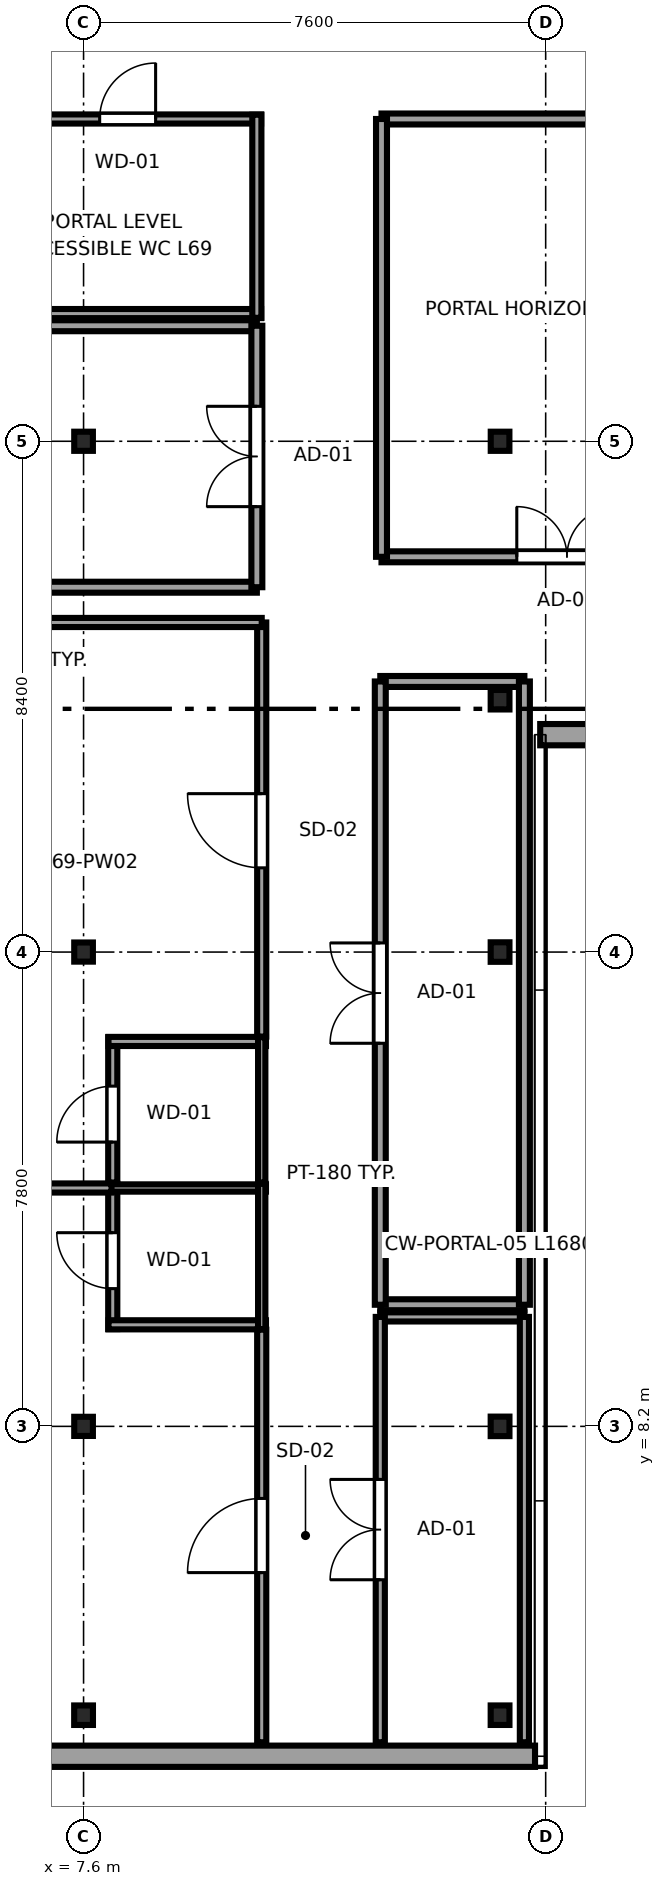
"""IFC4 building model, lengths in metres.
Left out: names, types, materials, properties, quantities, classifications, styles, units other than length and angle.
Written with IfcOpenShell. Run it as: python <this file> out.ifc"""

import sys

from ifc_helpers import new_model, si_unit, direction, frame, frame_2d, origin, origin_2d, place, context, subcontext, project, spatial, rectangle, i_section, extrude, source, transform, mapped, element, fill, save


model = new_model("IFC4")
c1 = context("Model", 3, precision=1e-05, world=origin(), true_north=direction((0.0, 1.0)))
c2 = subcontext(c1, "Body", "Model", "MODEL_VIEW")
j1 = project(units=[si_unit("LENGTHUNIT", "METRE"), si_unit("PLANEANGLEUNIT", "RADIAN")], contexts=[c1])
p1 = place(None, origin())
s1 = spatial("IfcSite", under=j1, at=p1, CompositionType="ELEMENT")
p2 = place(p1, origin())
s2 = spatial("IfcBuilding", under=s1, at=p2, CompositionType="ELEMENT")
p3 = place(p2, frame((0.0, 0.0, 259.4)))
s3 = spatial("IfcBuildingStorey", under=s2, at=p3, CompositionType="ELEMENT", Elevation=259.4)
m1 = source(origin(), c2, "Body", "SweptSolid", [
    extrude(i_section(OverallWidth=0.309, OverallDepth=0.321, WebThickness=0.014, FlangeThickness=0.022, FilletRadius=0.017, at=origin_2d()), origin(), (0.0, 0.0, 1.0), 3.55),
])
p4 = place(p3, frame((7.6, 3.45, 0.0), z_axis=(0.0, 0.0, 1.0), x_axis=(1.0, 0.0, 0.0)))
e1 = element("IfcColumn", 1, at=p4, inside=s3, PredefinedType="COLUMN", context=c2, shape_type="MappedRepresentation", body=[
    mapped(m1, transform((0.0, 0.0, 0.0), x_axis=(1.0, 0.0, 0.0), y_axis=(0.0, 1.0, 0.0), z_axis=(0.0, 0.0, 1.0), scale=1.0)),
])
m2 = source(origin(), c2, "Body", "SweptSolid", [
    extrude(i_section(OverallWidth=0.307, OverallDepth=0.315, WebThickness=0.012, FlangeThickness=0.019, FilletRadius=0.017, at=origin_2d()), origin(), (0.0, 0.0, 1.0), 3.55),
])
for number, where, z_axis, x_axis in (
    (2, (7.6, 8.2, 0.0), (0.0, 0.0, 1.0), (1.0, 0.0, 0.0)),
    (3, (7.6, 16.0, 0.0), (0.0, 0.0, 1.0), (1.0, 0.0, 0.0)),
):
    element("IfcColumn", number, at=place(p3, frame(where, z_axis=z_axis, x_axis=x_axis)), inside=s3, PredefinedType="COLUMN", context=c2, shape_type="MappedRepresentation", body=[
        mapped(m2, transform((0.0, 0.0, 0.0), x_axis=(1.0, 0.0, 0.0), y_axis=(0.0, 1.0, 0.0), z_axis=(0.0, 0.0, 1.0), scale=1.0)),
    ])
for number, where, z_axis, x_axis in (
    (4, (14.45, 3.45, 0.0), (0.0, 0.0, 1.0), (1.0, 0.0, 0.0)),
    (5, (14.45, 8.2, 0.0), (0.0, 0.0, 1.0), (1.0, 0.0, 0.0)),
    (6, (14.45, 16.0, 0.0), (0.0, 0.0, 1.0), (1.0, 0.0, 0.0)),
):
    element("IfcColumn", number, at=place(p3, frame(where, z_axis=z_axis, x_axis=x_axis)), inside=s3, PredefinedType="COLUMN", context=c2, shape_type="MappedRepresentation", body=[
        mapped(m1, transform((0.0, 0.0, 0.0), x_axis=(1.0, 0.0, 0.0), y_axis=(0.0, 1.0, 0.0), z_axis=(0.0, 0.0, 1.0), scale=1.0)),
    ])
for number, where, z_axis, x_axis in (
    (7, (7.6, 24.4, 0.0), (0.0, 0.0, 1.0), (1.0, 0.0, 0.0)),
    (8, (14.45, 24.4, 0.0), (0.0, 0.0, 1.0), (1.0, 0.0, 0.0)),
):
    element("IfcColumn", number, at=place(p3, frame(where, z_axis=z_axis, x_axis=x_axis)), inside=s3, PredefinedType="COLUMN", context=c2, shape_type="MappedRepresentation", body=[
        mapped(m2, transform((0.0, 0.0, 0.0), x_axis=(1.0, 0.0, 0.0), y_axis=(0.0, 1.0, 0.0), z_axis=(0.0, 0.0, 1.0), scale=1.0)),
    ])
p5 = place(p3, frame((14.45, 20.15, 0.0), z_axis=(0.0, 0.0, 1.0), x_axis=(1.0, 0.0, 0.0)))
e9 = element("IfcColumn", 9, at=p5, inside=s3, PredefinedType="COLUMN", context=c2, shape_type="MappedRepresentation", body=[
    mapped(m1, transform((0.0, 0.0, 0.0), x_axis=(1.0, 0.0, 0.0), y_axis=(0.0, 1.0, 0.0), z_axis=(0.0, 0.0, 1.0), scale=1.0)),
])
p6 = place(p3, frame((7.017, 2.775, 0.0), z_axis=(0.0, 0.0, 1.0), x_axis=(1.0, 0.0, 0.0)))
e10 = element("IfcWall", 10, at=p6, inside=s3, PredefinedType="SOLIDWALL", context=c2, shape_type="SweptSolid", body=[
    extrude(rectangle(XDim=8.008, YDim=0.35, at=frame_2d((4.004, 0.0))), origin(), (0.0, 0.0, 1.0), 3.37),
])
p7 = place(p3, frame((15.11, 19.575, 0.0), z_axis=(0.0, 0.0, 1.0), x_axis=(1.0, 0.0, 0.0)))
e11 = element("IfcWall", 11, at=p7, inside=s3, PredefinedType="SOLIDWALL", context=c2, shape_type="SweptSolid", body=[
    extrude(rectangle(XDim=16.98, YDim=0.35, at=frame_2d((8.49, 0.0))), origin(), (0.0, 0.0, 1.0), 3.37),
])
p8 = place(p7, frame((1.88, 0.0, 0.68)))
e12 = element("IfcOpeningElement", 12, at=p8, cuts=e11, PredefinedType="OPENING", context=c2, shape_type="SweptSolid", body=[
    extrude(rectangle(XDim=2.7, YDim=1.95, at=frame_2d((1.35, 0.975))), frame((0.0, 0.185, 0.0), z_axis=(0.0, -1.0, 0.0), x_axis=(1.0, 0.0, 0.0)), (0.0, 0.0, 1.0), 0.37),
])
p9 = place(p7, frame((7.14, 0.0, 0.68)))
e13 = element("IfcOpeningElement", 13, at=p9, cuts=e11, PredefinedType="OPENING", context=c2, shape_type="SweptSolid", body=[
    extrude(rectangle(XDim=2.7, YDim=1.95, at=frame_2d((1.35, 0.975))), frame((0.0, 0.185, 0.0), z_axis=(0.0, -1.0, 0.0), x_axis=(1.0, 0.0, 0.0)), (0.0, 0.0, 1.0), 0.37),
])
p10 = place(p7, frame((12.4, 0.0, 0.68)))
e14 = element("IfcOpeningElement", 14, at=p10, cuts=e11, PredefinedType="OPENING", context=c2, shape_type="SweptSolid", body=[
    extrude(rectangle(XDim=2.7, YDim=1.95, at=frame_2d((1.35, 0.975))), frame((0.0, 0.185, 0.0), z_axis=(0.0, -1.0, 0.0), x_axis=(1.0, 0.0, 0.0)), (0.0, 0.0, 1.0), 0.37),
])
p11 = place(p3, frame((8.08, 9.8, 0.0), z_axis=(0.0, 0.0, 1.0), x_axis=(0.0, 1.0, 0.0)))
e15 = element("IfcWall", 15, at=p11, inside=s3, PredefinedType="PARTITIONING", context=c2, shape_type="SweptSolid", body=[
    extrude(rectangle(XDim=2.39, YDim=0.15, at=frame_2d((1.195, 0.0))), origin(), (0.0, 0.0, 1.0), 3.37),
])
p12 = place(p11, frame((0.665, 0.0, 0.0)))
e16 = element("IfcOpeningElement", 16, at=p12, cuts=e15, PredefinedType="OPENING", context=c2, shape_type="SweptSolid", body=[
    extrude(rectangle(XDim=0.92, YDim=2.01, at=frame_2d((0.46, 1.005))), frame((0.0, 0.085, 0.0), z_axis=(0.0, -1.0, 0.0), x_axis=(1.0, 0.0, 0.0)), (0.0, 0.0, 1.0), 0.17),
])
p13 = place(p3, frame((8.01, 9.87, 0.0), z_axis=(0.0, 0.0, 1.0), x_axis=(1.0, 0.0, 0.0)))
e17 = element("IfcWall", 17, at=p13, inside=s3, PredefinedType="PARTITIONING", context=c2, shape_type="SweptSolid", body=[
    extrude(rectangle(XDim=2.59, YDim=0.15, at=frame_2d((1.295, 0.0))), origin(), (0.0, 0.0, 1.0), 3.37),
])
p14 = place(p3, frame((8.01, 12.12, 0.0), z_axis=(0.0, 0.0, 1.0), x_axis=(1.0, 0.0, 0.0)))
e18 = element("IfcWall", 18, at=p14, inside=s3, PredefinedType="PLUMBINGWALL", context=c2, shape_type="SweptSolid", body=[
    extrude(rectangle(XDim=2.59, YDim=0.12, at=frame_2d((1.295, 0.0))), origin(), (0.0, 0.0, 1.0), 3.37),
])
p15 = place(p3, frame((10.53, 9.8, 0.0), z_axis=(0.0, 0.0, 1.0), x_axis=(0.0, 1.0, 0.0)))
e19 = element("IfcWall", 19, at=p15, inside=s3, PredefinedType="PLUMBINGWALL", context=c2, shape_type="SweptSolid", body=[
    extrude(rectangle(XDim=2.39, YDim=0.12, at=frame_2d((1.195, 0.0))), origin(), (0.0, 0.0, 1.0), 3.37),
])
p16 = place(p3, frame((8.08, 12.21, 0.0), z_axis=(0.0, 0.0, 1.0), x_axis=(0.0, 1.0, 0.0)))
e20 = element("IfcWall", 20, at=p16, inside=s3, PredefinedType="PARTITIONING", context=c2, shape_type="SweptSolid", body=[
    extrude(rectangle(XDim=2.39, YDim=0.15, at=frame_2d((1.195, 0.0))), origin(), (0.0, 0.0, 1.0), 3.37),
])
p17 = place(p16, frame((0.665, 0.0, 0.0)))
e21 = element("IfcOpeningElement", 21, at=p17, cuts=e20, PredefinedType="OPENING", context=c2, shape_type="SweptSolid", body=[
    extrude(rectangle(XDim=0.92, YDim=2.01, at=frame_2d((0.46, 1.005))), frame((0.0, 0.085, 0.0), z_axis=(0.0, -1.0, 0.0), x_axis=(1.0, 0.0, 0.0)), (0.0, 0.0, 1.0), 0.17),
])
p18 = place(p3, frame((8.01, 14.53, 0.0), z_axis=(0.0, 0.0, 1.0), x_axis=(1.0, 0.0, 0.0)))
e22 = element("IfcWall", 22, at=p18, inside=s3, PredefinedType="PARTITIONING", context=c2, shape_type="SweptSolid", body=[
    extrude(rectangle(XDim=2.59, YDim=0.15, at=frame_2d((1.295, 0.0))), origin(), (0.0, 0.0, 1.0), 3.37),
])
p19 = place(p3, frame((10.53, 12.21, 0.0), z_axis=(0.0, 0.0, 1.0), x_axis=(0.0, 1.0, 0.0)))
e23 = element("IfcWall", 23, at=p19, inside=s3, PredefinedType="PLUMBINGWALL", context=c2, shape_type="SweptSolid", body=[
    extrude(rectangle(XDim=2.39, YDim=0.12, at=frame_2d((1.195, 0.0))), origin(), (0.0, 0.0, 1.0), 3.37),
])
p20 = place(p3, frame((10.53, 3.005, 0.0), z_axis=(0.0, 0.0, 1.0), x_axis=(0.0, 1.0, 0.0)))
e24 = element("IfcWall", 24, at=p20, inside=s3, PredefinedType="PARTITIONING", context=c2, shape_type="SweptSolid", body=[
    extrude(rectangle(XDim=6.785, YDim=0.15, at=frame_2d((3.393, 0.0))), origin(), (0.0, 0.0, 1.0), 3.37),
])
p21 = place(p20, frame((2.79, 0.0, 0.0)))
e25 = element("IfcOpeningElement", 25, at=p21, cuts=e24, PredefinedType="OPENING", context=c2, shape_type="SweptSolid", body=[
    extrude(rectangle(XDim=1.22, YDim=2.08, at=frame_2d((0.61, 1.04))), frame((0.0, 0.085, 0.0), z_axis=(0.0, -1.0, 0.0), x_axis=(1.0, 0.0, 0.0)), (0.0, 0.0, 1.0), 0.17),
])
p22 = place(p3, frame((3.005, 12.12, 0.0), z_axis=(0.0, 0.0, 1.0), x_axis=(1.0, 0.0, 0.0)))
e26 = element("IfcWall", 26, at=p22, inside=s3, PredefinedType="PARTITIONING", context=c2, shape_type="SweptSolid", body=[
    extrude(rectangle(XDim=5.055, YDim=0.15, at=frame_2d((2.528, 0.0))), origin(), (0.0, 0.0, 1.0), 3.37),
])
p23 = place(p3, frame((10.53, 14.61, 0.0), z_axis=(0.0, 0.0, 1.0), x_axis=(0.0, 1.0, 0.0)))
e27 = element("IfcWall", 27, at=p23, inside=s3, PredefinedType="PARTITIONING", context=c2, shape_type="SweptSolid", body=[
    extrude(rectangle(XDim=6.81, YDim=0.15, at=frame_2d((3.405, 0.0))), origin(), (0.0, 0.0, 1.0), 3.37),
])
p24 = place(p23, frame((2.775, 0.0, 0.0)))
e28 = element("IfcOpeningElement", 28, at=p24, cuts=e27, PredefinedType="OPENING", context=c2, shape_type="SweptSolid", body=[
    extrude(rectangle(XDim=1.22, YDim=2.08, at=frame_2d((0.61, 1.04))), frame((0.0, 0.085, 0.0), z_axis=(0.0, -1.0, 0.0), x_axis=(1.0, 0.0, 0.0)), (0.0, 0.0, 1.0), 0.17),
])
p25 = place(p3, frame((3.005, 21.42, 0.0), z_axis=(0.0, 0.0, 1.0), x_axis=(1.0, 0.0, 0.0)))
e29 = element("IfcWall", 29, at=p25, inside=s3, PredefinedType="PARTITIONING", context=c2, shape_type="SweptSolid", body=[
    extrude(rectangle(XDim=7.525, YDim=0.15, at=frame_2d((3.763, 0.0))), origin(), (0.0, 0.0, 1.0), 3.37),
])
for number, where, z_axis, x_axis in (
    (30, (12.48, 10.2, 0.0), (0.0, 0.0, 1.0), (1.0, 0.0, 0.0)),
    (31, (12.48, 20.45, 0.0), (0.0, 0.0, 1.0), (1.0, 0.0, 0.0)),
):
    element("IfcWall", number, at=place(p3, frame(where, z_axis=z_axis, x_axis=x_axis)), inside=s3, PredefinedType="PARTITIONING", context=c2, shape_type="SweptSolid", body=[
        extrude(rectangle(XDim=2.37, YDim=0.18, at=frame_2d((1.185, 0.0))), origin(), (0.0, 0.0, 1.0), 3.37),
    ])
p26 = place(p3, frame((12.48, 10.2, 0.0), z_axis=(0.0, 0.0, 1.0), x_axis=(0.0, 1.0, 0.0)))
e32 = element("IfcWall", 32, at=p26, inside=s3, PredefinedType="PARTITIONING", context=c2, shape_type="SweptSolid", body=[
    extrude(rectangle(XDim=10.25, YDim=0.18, at=frame_2d((5.125, 0.0))), origin(), (0.0, 0.0, 1.0), 3.37),
])
p27 = place(p26, frame((4.3, 0.0, 0.0)))
e33 = element("IfcOpeningElement", 33, at=p27, cuts=e32, PredefinedType="OPENING", context=c2, shape_type="SweptSolid", body=[
    extrude(rectangle(XDim=1.65, YDim=2.15, at=frame_2d((0.825, 1.075))), frame((0.0, 0.1, 0.0), z_axis=(0.0, -1.0, 0.0), x_axis=(1.0, 0.0, 0.0)), (0.0, 0.0, 1.0), 0.2),
])
p28 = place(p3, frame((14.85, 10.2, 0.0), z_axis=(0.0, 0.0, 1.0), x_axis=(0.0, 1.0, 0.0)))
e34 = element("IfcWall", 34, at=p28, inside=s3, PredefinedType="PARTITIONING", context=c2, shape_type="SweptSolid", body=[
    extrude(rectangle(XDim=10.25, YDim=0.18, at=frame_2d((5.125, 0.0))), origin(), (0.0, 0.0, 1.0), 3.37),
])
p29 = place(p3, frame((12.48, 10.0, 0.0), z_axis=(0.0, 0.0, 1.0), x_axis=(1.0, 0.0, 0.0)))
e35 = element("IfcWall", 35, at=p29, inside=s3, PredefinedType="PARTITIONING", context=c2, shape_type="SweptSolid", body=[
    extrude(rectangle(XDim=2.37, YDim=0.15, at=frame_2d((1.185, 0.0))), origin(), (0.0, 0.0, 1.0), 3.37),
])
p30 = place(p3, frame((12.48, 3.005, 0.0), z_axis=(0.0, 0.0, 1.0), x_axis=(0.0, 1.0, 0.0)))
e36 = element("IfcWall", 36, at=p30, inside=s3, PredefinedType="PARTITIONING", context=c2, shape_type="SweptSolid", body=[
    extrude(rectangle(XDim=6.995, YDim=0.15, at=frame_2d((3.498, 0.0))), origin(), (0.0, 0.0, 1.0), 3.37),
])
p31 = place(p30, frame((2.673, 0.0, 0.0)))
e37 = element("IfcOpeningElement", 37, at=p31, cuts=e36, PredefinedType="OPENING", context=c2, shape_type="SweptSolid", body=[
    extrude(rectangle(XDim=1.65, YDim=2.15, at=frame_2d((0.825, 1.075))), frame((0.0, 0.085, 0.0), z_axis=(0.0, -1.0, 0.0), x_axis=(1.0, 0.0, 0.0)), (0.0, 0.0, 1.0), 0.17),
])
p32 = place(p3, frame((14.85, 3.005, 0.0), z_axis=(0.0, 0.0, 1.0), x_axis=(0.0, 1.0, 0.0)))
e38 = element("IfcWall", 38, at=p32, inside=s3, PredefinedType="PARTITIONING", context=c2, shape_type="SweptSolid", body=[
    extrude(rectangle(XDim=6.995, YDim=0.15, at=frame_2d((3.498, 0.0))), origin(), (0.0, 0.0, 1.0), 3.37),
])
p33 = place(p3, frame((12.5, 22.5, 0.0), z_axis=(0.0, 0.0, 1.0), x_axis=(1.0, 0.0, 0.0)))
e39 = element("IfcWall", 39, at=p33, inside=s3, PredefinedType="PARTITIONING", context=c2, shape_type="SweptSolid", body=[
    extrude(rectangle(XDim=6.1, YDim=0.18, at=frame_2d((3.05, 0.0))), origin(), (0.0, 0.0, 1.0), 3.37),
])
p34 = place(p33, frame((2.225, 0.0, 0.0)))
e40 = element("IfcOpeningElement", 40, at=p34, cuts=e39, PredefinedType="OPENING", context=c2, shape_type="SweptSolid", body=[
    extrude(rectangle(XDim=1.65, YDim=2.15, at=frame_2d((0.825, 1.075))), frame((0.0, 0.1, 0.0), z_axis=(0.0, -1.0, 0.0), x_axis=(1.0, 0.0, 0.0)), (0.0, 0.0, 1.0), 0.2),
])
p35 = place(p3, frame((12.5, 29.7, 0.0), z_axis=(0.0, 0.0, 1.0), x_axis=(1.0, 0.0, 0.0)))
e41 = element("IfcWall", 41, at=p35, inside=s3, PredefinedType="PARTITIONING", context=c2, shape_type="SweptSolid", body=[
    extrude(rectangle(XDim=6.1, YDim=0.18, at=frame_2d((3.05, 0.0))), origin(), (0.0, 0.0, 1.0), 3.37),
])
p36 = place(p3, frame((12.5, 22.5, 0.0), z_axis=(0.0, 0.0, 1.0), x_axis=(0.0, 1.0, 0.0)))
e42 = element("IfcWall", 42, at=p36, inside=s3, PredefinedType="PARTITIONING", context=c2, shape_type="SweptSolid", body=[
    extrude(rectangle(XDim=7.2, YDim=0.18, at=frame_2d((3.6, 0.0))), origin(), (0.0, 0.0, 1.0), 3.37),
])
for number, where, z_axis, x_axis in (
    (43, (3.005, 22.0, 0.0), (0.0, 0.0, 1.0), (1.0, 0.0, 0.0)),
    (44, (3.005, 26.3, 0.0), (0.0, 0.0, 1.0), (1.0, 0.0, 0.0)),
):
    element("IfcWall", number, at=place(p3, frame(where, z_axis=z_axis, x_axis=x_axis)), inside=s3, PredefinedType="PARTITIONING", context=c2, shape_type="SweptSolid", body=[
        extrude(rectangle(XDim=7.445, YDim=0.18, at=frame_2d((3.723, 0.0))), origin(), (0.0, 0.0, 1.0), 3.37),
    ])
p37 = place(p3, frame((10.45, 22.0, 0.0), z_axis=(0.0, 0.0, 1.0), x_axis=(0.0, 1.0, 0.0)))
e45 = element("IfcWall", 45, at=p37, inside=s3, PredefinedType="PARTITIONING", context=c2, shape_type="SweptSolid", body=[
    extrude(rectangle(XDim=4.3, YDim=0.18, at=frame_2d((2.15, 0.0))), origin(), (0.0, 0.0, 1.0), 3.37),
])
p38 = place(p37, frame((1.325, 0.0, 0.0)))
e46 = element("IfcOpeningElement", 46, at=p38, cuts=e45, PredefinedType="OPENING", context=c2, shape_type="SweptSolid", body=[
    extrude(rectangle(XDim=1.65, YDim=2.15, at=frame_2d((0.825, 1.075))), frame((0.0, 0.1, 0.0), z_axis=(0.0, -1.0, 0.0), x_axis=(1.0, 0.0, 0.0)), (0.0, 0.0, 1.0), 0.2),
])
p39 = place(p3, frame((6.13, 26.5, 0.0), z_axis=(0.0, 0.0, 1.0), x_axis=(1.0, 0.0, 0.0)))
e47 = element("IfcWall", 47, at=p39, inside=s3, PredefinedType="PARTITIONING", context=c2, shape_type="SweptSolid", body=[
    extrude(rectangle(XDim=4.39, YDim=0.15, at=frame_2d((2.195, 0.0))), origin(), (0.0, 0.0, 1.0), 3.37),
])
p40 = place(p3, frame((6.13, 29.7, 0.0), z_axis=(0.0, 0.0, 1.0), x_axis=(1.0, 0.0, 0.0)))
e48 = element("IfcWall", 48, at=p40, inside=s3, PredefinedType="PARTITIONING", context=c2, shape_type="SweptSolid", body=[
    extrude(rectangle(XDim=4.39, YDim=0.15, at=frame_2d((2.195, 0.0))), origin(), (0.0, 0.0, 1.0), 3.37),
])
p41 = place(p40, frame((1.735, 0.0, 0.0)))
e49 = element("IfcOpeningElement", 49, at=p41, cuts=e48, PredefinedType="OPENING", context=c2, shape_type="SweptSolid", body=[
    extrude(rectangle(XDim=0.92, YDim=2.01, at=frame_2d((0.46, 1.005))), frame((0.0, 0.085, 0.0), z_axis=(0.0, -1.0, 0.0), x_axis=(1.0, 0.0, 0.0)), (0.0, 0.0, 1.0), 0.17),
])
p42 = place(p3, frame((10.45, 26.43, 0.0), z_axis=(0.0, 0.0, 1.0), x_axis=(0.0, 1.0, 0.0)))
e50 = element("IfcWall", 50, at=p42, inside=s3, PredefinedType="PARTITIONING", context=c2, shape_type="SweptSolid", body=[
    extrude(rectangle(XDim=3.34, YDim=0.15, at=frame_2d((1.67, 0.0))), origin(), (0.0, 0.0, 1.0), 3.37),
])
m3 = source(origin(), c2, "Body", "SweptSolid", [
    extrude(rectangle(XDim=0.92, YDim=2.01, at=frame_2d((0.46, 1.005))), frame((0.0, 0.025, 0.0), z_axis=(0.0, -1.0, 0.0), x_axis=(1.0, 0.0, 0.0)), (0.0, 0.0, 1.0), 0.05),
])
p43 = place(p12, origin())
e51 = element("IfcDoor", 51, at=p43, inside=s3, OperationType="SINGLE_SWING_RIGHT", PredefinedType="DOOR", context=c2, shape_type="MappedRepresentation", body=[
    mapped(m3, transform((0.0, 0.0, 0.0), x_axis=(1.0, 0.0, 0.0), y_axis=(0.0, 1.0, 0.0), z_axis=(0.0, 0.0, 1.0), scale=1.0)),
])
fill(e16, e51)
p44 = place(p17, origin())
e52 = element("IfcDoor", 52, at=p44, inside=s3, OperationType="SINGLE_SWING_LEFT", PredefinedType="DOOR", context=c2, shape_type="MappedRepresentation", body=[
    mapped(m3, transform((0.0, 0.0, 0.0), x_axis=(1.0, 0.0, 0.0), y_axis=(0.0, 1.0, 0.0), z_axis=(0.0, 0.0, 1.0), scale=1.0)),
])
fill(e21, e52)
m4 = source(origin(), c2, "Body", "SweptSolid", [
    extrude(rectangle(XDim=1.22, YDim=2.08, at=frame_2d((0.61, 1.04))), frame((0.0, 0.025, 0.0), z_axis=(0.0, -1.0, 0.0), x_axis=(1.0, 0.0, 0.0)), (0.0, 0.0, 1.0), 0.05),
])
p45 = place(p21, origin())
e53 = element("IfcDoor", 53, at=p45, inside=s3, OperationType="SINGLE_SWING_LEFT", PredefinedType="DOOR", context=c2, shape_type="MappedRepresentation", body=[
    mapped(m4, transform((0.0, 0.0, 0.0), x_axis=(1.0, 0.0, 0.0), y_axis=(0.0, 1.0, 0.0), z_axis=(0.0, 0.0, 1.0), scale=1.0)),
])
fill(e25, e53)
p46 = place(p24, origin())
e54 = element("IfcDoor", 54, at=p46, inside=s3, OperationType="SINGLE_SWING_RIGHT", PredefinedType="DOOR", context=c2, shape_type="MappedRepresentation", body=[
    mapped(m4, transform((0.0, 0.0, 0.0), x_axis=(1.0, 0.0, 0.0), y_axis=(0.0, 1.0, 0.0), z_axis=(0.0, 0.0, 1.0), scale=1.0)),
])
fill(e28, e54)
m5 = source(origin(), c2, "Body", "SweptSolid", [
    extrude(rectangle(XDim=1.65, YDim=2.15, at=frame_2d((0.825, 1.075))), frame((0.0, 0.025, 0.0), z_axis=(0.0, -1.0, 0.0), x_axis=(1.0, 0.0, 0.0)), (0.0, 0.0, 1.0), 0.05),
])
p47 = place(p27, origin())
e55 = element("IfcDoor", 55, at=p47, inside=s3, OperationType="DOUBLE_DOOR_SINGLE_SWING", PredefinedType="DOOR", context=c2, shape_type="MappedRepresentation", body=[
    mapped(m5, transform((0.0, 0.0, 0.0), x_axis=(1.0, 0.0, 0.0), y_axis=(0.0, 1.0, 0.0), z_axis=(0.0, 0.0, 1.0), scale=1.0)),
])
fill(e33, e55)
p48 = place(p31, origin())
e56 = element("IfcDoor", 56, at=p48, inside=s3, OperationType="DOUBLE_DOOR_SINGLE_SWING", PredefinedType="DOOR", context=c2, shape_type="MappedRepresentation", body=[
    mapped(m5, transform((0.0, 0.0, 0.0), x_axis=(1.0, 0.0, 0.0), y_axis=(0.0, 1.0, 0.0), z_axis=(0.0, 0.0, 1.0), scale=1.0)),
])
fill(e37, e56)
p49 = place(p34, origin())
e57 = element("IfcDoor", 57, at=p49, inside=s3, OperationType="DOUBLE_DOOR_SINGLE_SWING", PredefinedType="DOOR", context=c2, shape_type="MappedRepresentation", body=[
    mapped(m5, transform((0.0, 0.0, 0.0), x_axis=(1.0, 0.0, 0.0), y_axis=(0.0, 1.0, 0.0), z_axis=(0.0, 0.0, 1.0), scale=1.0)),
])
fill(e40, e57)
p50 = place(p38, origin())
e58 = element("IfcDoor", 58, at=p50, inside=s3, OperationType="DOUBLE_DOOR_SINGLE_SWING", PredefinedType="DOOR", context=c2, shape_type="MappedRepresentation", body=[
    mapped(m5, transform((0.0, 0.0, 0.0), x_axis=(1.0, 0.0, 0.0), y_axis=(0.0, 1.0, 0.0), z_axis=(0.0, 0.0, 1.0), scale=1.0)),
])
fill(e46, e58)
p51 = place(p41, origin())
e59 = element("IfcDoor", 59, at=p51, inside=s3, OperationType="SINGLE_SWING_RIGHT", PredefinedType="DOOR", context=c2, shape_type="MappedRepresentation", body=[
    mapped(m3, transform((0.0, 0.0, 0.0), x_axis=(1.0, 0.0, 0.0), y_axis=(0.0, 1.0, 0.0), z_axis=(0.0, 0.0, 1.0), scale=1.0)),
])
fill(e49, e59)
save(model, sys.argv[1])
